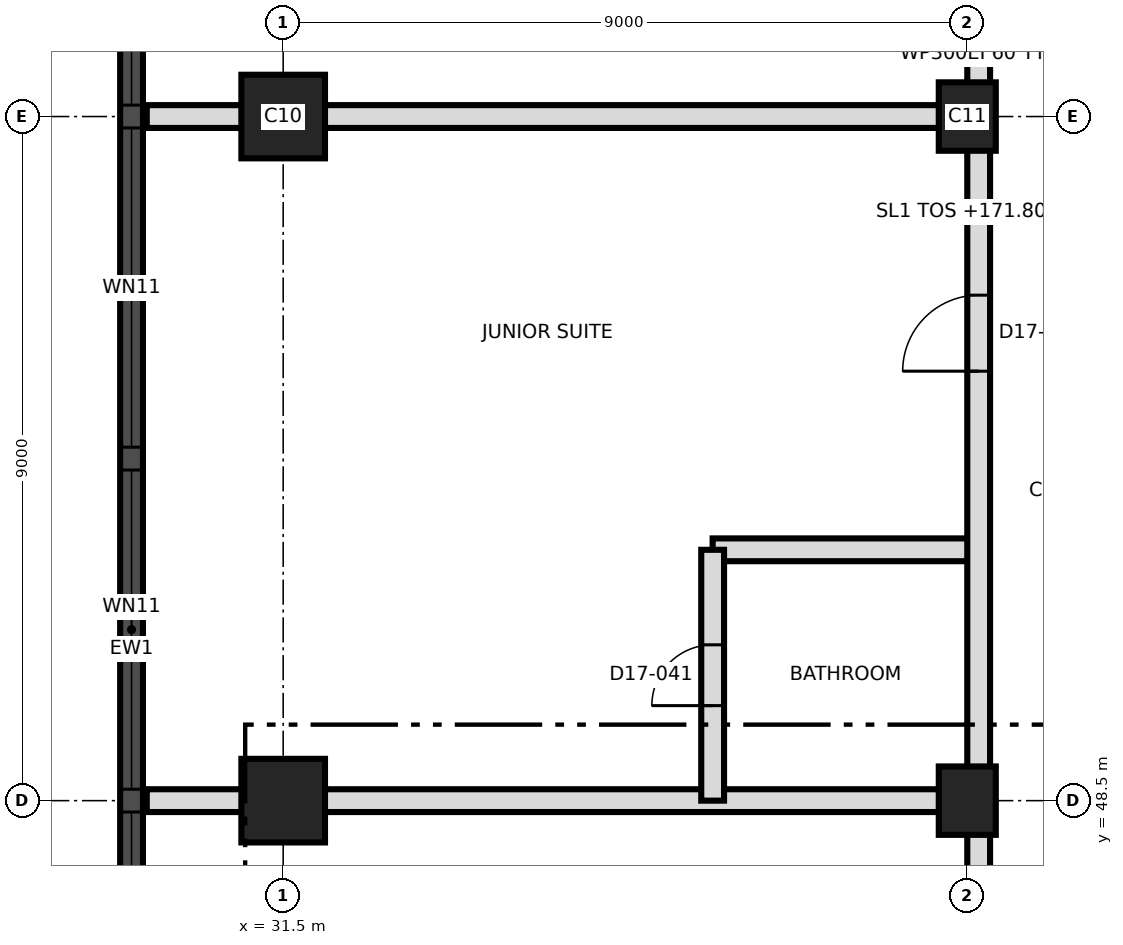
"""IFC4 building model, lengths in metres.
Left out: names, types, materials, properties, quantities, classifications, styles, units other than length and angle.
Written with IfcOpenShell. Run it as: python <this file> out.ifc"""

import sys

from ifc_helpers import new_model, si_unit, direction, frame, frame_2d, origin, origin_2d, place, context, subcontext, project, spatial, rectangle, extrude, element, fill, save


model = new_model("IFC4")
c1 = context("Model", 3, precision=1e-05, world=origin(), true_north=direction((0.0, 1.0)))
c2 = subcontext(c1, "Body", "Model", "MODEL_VIEW")
j1 = project(units=[si_unit("LENGTHUNIT", "METRE"), si_unit("PLANEANGLEUNIT", "RADIAN")], contexts=[c1])
p1 = place(None, origin())
s1 = spatial("IfcSite", under=j1, at=p1, CompositionType="ELEMENT")
p2 = place(p1, origin())
s2 = spatial("IfcBuilding", under=s1, at=p2, CompositionType="ELEMENT")
p3 = place(p2, frame((0.0, 0.0, 171.8)))
s3 = spatial("IfcBuildingStorey", under=s2, at=p3, CompositionType="ELEMENT", Elevation=171.8)
p4 = place(p3, frame((31.5, 48.5, 0.0), z_axis=(0.0, 0.0, 1.0), x_axis=(1.0, 0.0, 0.0)))
e1 = element("IfcColumn", 1, at=p4, inside=s3, PredefinedType="COLUMN", context=c2, shape_type="SweptSolid", body=[
    extrude(rectangle(XDim=1.1, YDim=1.1, at=origin_2d()), origin(), (0.0, 0.0, 1.0), 3.7),
])
p5 = place(p3, frame((40.5, 48.5, 0.0), z_axis=(0.0, 0.0, 1.0), x_axis=(0.0, 1.0, 0.0)))
e2 = element("IfcColumn", 2, at=p5, inside=s3, PredefinedType="COLUMN", context=c2, shape_type="SweptSolid", body=[
    extrude(rectangle(XDim=0.9, YDim=0.75, at=origin_2d()), origin(), (0.0, 0.0, 1.0), 3.7),
])
p6 = place(p3, frame((31.5, 57.5, 0.0), z_axis=(0.0, 0.0, 1.0), x_axis=(1.0, 0.0, 0.0)))
e3 = element("IfcColumn", 3, at=p6, inside=s3, PredefinedType="COLUMN", context=c2, shape_type="SweptSolid", body=[
    extrude(rectangle(XDim=1.1, YDim=1.1, at=origin_2d()), origin(), (0.0, 0.0, 1.0), 3.7),
])
p7 = place(p3, frame((40.5, 57.5, 0.0), z_axis=(0.0, 0.0, 1.0), x_axis=(0.0, 1.0, 0.0)))
e4 = element("IfcColumn", 4, at=p7, inside=s3, PredefinedType="COLUMN", context=c2, shape_type="SweptSolid", body=[
    extrude(rectangle(XDim=0.9, YDim=0.75, at=origin_2d()), origin(), (0.0, 0.0, 1.0), 3.7),
])
p8 = place(p3, frame((29.505, 66.986, 0.0), z_axis=(0.0, 0.0, 1.0), x_axis=(0.0, -1.0, 0.0)))
e5 = element("IfcWall", 5, at=p8, inside=s3, PredefinedType="SOLIDWALL", context=c2, shape_type="SweptSolid", body=[
    extrude(rectangle(XDim=32.976, YDim=0.3, at=frame_2d((16.488, 0.0))), origin(), (0.0, 0.0, 1.0), 3.4),
])
p9 = place(p8, frame((1.593, 0.0, 0.3)))
e6 = element("IfcOpeningElement", 6, at=p9, cuts=e5, PredefinedType="OPENING", context=c2, shape_type="SweptSolid", body=[
    extrude(rectangle(XDim=1.8, YDim=2.4, at=frame_2d((0.9, 1.2))), frame((0.0, 0.16, 0.0), z_axis=(0.0, -1.0, 0.0), x_axis=(1.0, 0.0, 0.0)), (0.0, 0.0, 1.0), 0.32),
])
p10 = place(p8, frame((5.136, 0.0, 0.9)))
e7 = element("IfcOpeningElement", 7, at=p10, cuts=e5, PredefinedType="OPENING", context=c2, shape_type="SweptSolid", body=[
    extrude(rectangle(XDim=4.2, YDim=1.5, at=frame_2d((2.1, 0.75))), frame((0.0, 0.16, 0.0), z_axis=(0.0, -1.0, 0.0), x_axis=(1.0, 0.0, 0.0)), (0.0, 0.0, 1.0), 0.32),
])
p11 = place(p8, frame((9.636, 0.0, 0.9)))
e8 = element("IfcOpeningElement", 8, at=p11, cuts=e5, PredefinedType="OPENING", context=c2, shape_type="SweptSolid", body=[
    extrude(rectangle(XDim=4.2, YDim=1.5, at=frame_2d((2.1, 0.75))), frame((0.0, 0.16, 0.0), z_axis=(0.0, -1.0, 0.0), x_axis=(1.0, 0.0, 0.0)), (0.0, 0.0, 1.0), 0.32),
])
p12 = place(p8, frame((14.136, 0.0, 0.9)))
e9 = element("IfcOpeningElement", 9, at=p12, cuts=e5, PredefinedType="OPENING", context=c2, shape_type="SweptSolid", body=[
    extrude(rectangle(XDim=4.2, YDim=1.5, at=frame_2d((2.1, 0.75))), frame((0.0, 0.16, 0.0), z_axis=(0.0, -1.0, 0.0), x_axis=(1.0, 0.0, 0.0)), (0.0, 0.0, 1.0), 0.32),
])
p13 = place(p8, frame((18.636, 0.0, 0.9)))
e10 = element("IfcOpeningElement", 10, at=p13, cuts=e5, PredefinedType="OPENING", context=c2, shape_type="SweptSolid", body=[
    extrude(rectangle(XDim=4.2, YDim=1.5, at=frame_2d((2.1, 0.75))), frame((0.0, 0.16, 0.0), z_axis=(0.0, -1.0, 0.0), x_axis=(1.0, 0.0, 0.0)), (0.0, 0.0, 1.0), 0.32),
])
p14 = place(p8, frame((23.136, 0.0, 0.9)))
e11 = element("IfcOpeningElement", 11, at=p14, cuts=e5, PredefinedType="OPENING", context=c2, shape_type="SweptSolid", body=[
    extrude(rectangle(XDim=4.2, YDim=1.5, at=frame_2d((2.1, 0.75))), frame((0.0, 0.16, 0.0), z_axis=(0.0, -1.0, 0.0), x_axis=(1.0, 0.0, 0.0)), (0.0, 0.0, 1.0), 0.32),
])
p15 = place(p8, frame((29.331, 0.0, 0.3)))
e12 = element("IfcOpeningElement", 12, at=p15, cuts=e5, PredefinedType="OPENING", context=c2, shape_type="SweptSolid", body=[
    extrude(rectangle(XDim=1.8, YDim=2.4, at=frame_2d((0.9, 1.2))), frame((0.0, 0.16, 0.0), z_axis=(0.0, -1.0, 0.0), x_axis=(1.0, 0.0, 0.0)), (0.0, 0.0, 1.0), 0.32),
])
p16 = place(p3, frame((29.705, 48.5, 0.0), z_axis=(0.0, 0.0, 1.0), x_axis=(1.0, 0.0, 0.0)))
e13 = element("IfcWall", 13, at=p16, inside=s3, PredefinedType="PARTITIONING", context=c2, shape_type="SweptSolid", body=[
    extrude(rectangle(XDim=10.945, YDim=0.3, at=frame_2d((5.472, 0.0))), origin(), (0.0, 0.0, 1.0), 3.4),
])
p17 = place(p3, frame((37.15, 51.8, 0.0), z_axis=(0.0, 0.0, 1.0), x_axis=(1.0, 0.0, 0.0)))
e14 = element("IfcWall", 14, at=p17, inside=s3, PredefinedType="PARTITIONING", context=c2, shape_type="SweptSolid", body=[
    extrude(rectangle(XDim=3.5, YDim=0.3, at=frame_2d((1.75, 0.0))), origin(), (0.0, 0.0, 1.0), 3.4),
])
p18 = place(p3, frame((29.705, 57.5, 0.0), z_axis=(0.0, 0.0, 1.0), x_axis=(1.0, 0.0, 0.0)))
e15 = element("IfcWall", 15, at=p18, inside=s3, PredefinedType="PARTITIONING", context=c2, shape_type="SweptSolid", body=[
    extrude(rectangle(XDim=10.945, YDim=0.3, at=frame_2d((5.472, 0.0))), origin(), (0.0, 0.0, 1.0), 3.4),
])
p19 = place(p3, frame((37.15, 48.5, 0.0), z_axis=(0.0, 0.0, 1.0), x_axis=(0.0, 1.0, 0.0)))
e16 = element("IfcWall", 16, at=p19, inside=s3, PredefinedType="PARTITIONING", context=c2, shape_type="SweptSolid", body=[
    extrude(rectangle(XDim=3.3, YDim=0.3, at=frame_2d((1.65, 0.0))), origin(), (0.0, 0.0, 1.0), 3.4),
])
p20 = place(p19, frame((1.25, 0.0, 0.0)))
e17 = element("IfcOpeningElement", 17, at=p20, cuts=e16, PredefinedType="OPENING", context=c2, shape_type="SweptSolid", body=[
    extrude(rectangle(XDim=0.8, YDim=2.1, at=frame_2d((0.4, 1.05))), frame((0.0, 0.16, 0.0), z_axis=(0.0, -1.0, 0.0), x_axis=(1.0, 0.0, 0.0)), (0.0, 0.0, 1.0), 0.32),
])
p21 = place(p3, frame((40.65, 39.65, 0.0), z_axis=(0.0, 0.0, 1.0), x_axis=(0.0, 1.0, 0.0)))
e18 = element("IfcWall", 18, at=p21, inside=s3, PredefinedType="PARTITIONING", context=c2, shape_type="SweptSolid", body=[
    extrude(rectangle(XDim=37.35, YDim=0.3, at=frame_2d((18.675, 0.0))), origin(), (0.0, 0.0, 1.0), 3.4),
])
p22 = place(p21, frame((1.0, 0.0, 0.0)))
e19 = element("IfcOpeningElement", 19, at=p22, cuts=e18, PredefinedType="OPENING", context=c2, shape_type="SweptSolid", body=[
    extrude(rectangle(XDim=1.0, YDim=2.1, at=frame_2d((0.5, 1.05))), frame((0.0, 0.16, 0.0), z_axis=(0.0, -1.0, 0.0), x_axis=(1.0, 0.0, 0.0)), (0.0, 0.0, 1.0), 0.32),
])
p23 = place(p21, frame((6.85, 0.0, 0.0)))
e20 = element("IfcOpeningElement", 20, at=p23, cuts=e18, PredefinedType="OPENING", context=c2, shape_type="SweptSolid", body=[
    extrude(rectangle(XDim=1.0, YDim=2.1, at=frame_2d((0.5, 1.05))), frame((0.0, 0.16, 0.0), z_axis=(0.0, -1.0, 0.0), x_axis=(1.0, 0.0, 0.0)), (0.0, 0.0, 1.0), 0.32),
])
p24 = place(p21, frame((14.5, 0.0, 0.0)))
e21 = element("IfcOpeningElement", 21, at=p24, cuts=e18, PredefinedType="OPENING", context=c2, shape_type="SweptSolid", body=[
    extrude(rectangle(XDim=1.0, YDim=2.4, at=frame_2d((0.5, 1.2))), frame((0.0, 0.16, 0.0), z_axis=(0.0, -1.0, 0.0), x_axis=(1.0, 0.0, 0.0)), (0.0, 0.0, 1.0), 0.32),
])
p25 = place(p21, frame((21.35, 0.0, 0.0)))
e22 = element("IfcOpeningElement", 22, at=p25, cuts=e18, PredefinedType="OPENING", context=c2, shape_type="SweptSolid", body=[
    extrude(rectangle(XDim=1.0, YDim=2.4, at=frame_2d((0.5, 1.2))), frame((0.0, 0.16, 0.0), z_axis=(0.0, -1.0, 0.0), x_axis=(1.0, 0.0, 0.0)), (0.0, 0.0, 1.0), 0.32),
])
p26 = place(p10, origin())
e23 = element("IfcWindow", 23, at=p26, inside=s3, PartitioningType="SINGLE_PANEL", PredefinedType="WINDOW", context=c2, shape_type="SweptSolid", body=[
    extrude(rectangle(XDim=4.2, YDim=1.5, at=frame_2d((2.1, 0.75))), frame((0.0, 0.03, 0.0), z_axis=(0.0, -1.0, 0.0), x_axis=(1.0, 0.0, 0.0)), (0.0, 0.0, 1.0), 0.06),
])
fill(e7, e23)
p27 = place(p11, origin())
e24 = element("IfcWindow", 24, at=p27, inside=s3, PartitioningType="SINGLE_PANEL", PredefinedType="WINDOW", context=c2, shape_type="SweptSolid", body=[
    extrude(rectangle(XDim=4.2, YDim=1.5, at=frame_2d((2.1, 0.75))), frame((0.0, 0.03, 0.0), z_axis=(0.0, -1.0, 0.0), x_axis=(1.0, 0.0, 0.0)), (0.0, 0.0, 1.0), 0.06),
])
fill(e8, e24)
p28 = place(p12, origin())
e25 = element("IfcWindow", 25, at=p28, inside=s3, PartitioningType="SINGLE_PANEL", PredefinedType="WINDOW", context=c2, shape_type="SweptSolid", body=[
    extrude(rectangle(XDim=4.2, YDim=1.5, at=frame_2d((2.1, 0.75))), frame((0.0, 0.03, 0.0), z_axis=(0.0, -1.0, 0.0), x_axis=(1.0, 0.0, 0.0)), (0.0, 0.0, 1.0), 0.06),
])
fill(e9, e25)
p29 = place(p13, origin())
e26 = element("IfcWindow", 26, at=p29, inside=s3, PartitioningType="SINGLE_PANEL", PredefinedType="WINDOW", context=c2, shape_type="SweptSolid", body=[
    extrude(rectangle(XDim=4.2, YDim=1.5, at=frame_2d((2.1, 0.75))), frame((0.0, 0.03, 0.0), z_axis=(0.0, -1.0, 0.0), x_axis=(1.0, 0.0, 0.0)), (0.0, 0.0, 1.0), 0.06),
])
fill(e10, e26)
p30 = place(p20, origin())
e27 = element("IfcDoor", 27, at=p30, inside=s3, OperationType="SINGLE_SWING_LEFT", PredefinedType="DOOR", context=c2, shape_type="SweptSolid", body=[
    extrude(rectangle(XDim=0.8, YDim=2.1, at=frame_2d((0.4, 1.05))), frame((0.0, 0.025, 0.0), z_axis=(0.0, -1.0, 0.0), x_axis=(1.0, 0.0, 0.0)), (0.0, 0.0, 1.0), 0.05),
])
fill(e17, e27)
p31 = place(p24, origin())
e28 = element("IfcDoor", 28, at=p31, inside=s3, OperationType="SINGLE_SWING_LEFT", PredefinedType="DOOR", context=c2, shape_type="SweptSolid", body=[
    extrude(rectangle(XDim=1.0, YDim=2.4, at=frame_2d((0.5, 1.2))), frame((0.0, 0.025, 0.0), z_axis=(0.0, -1.0, 0.0), x_axis=(1.0, 0.0, 0.0)), (0.0, 0.0, 1.0), 0.05),
])
fill(e21, e28)
save(model, sys.argv[1])
